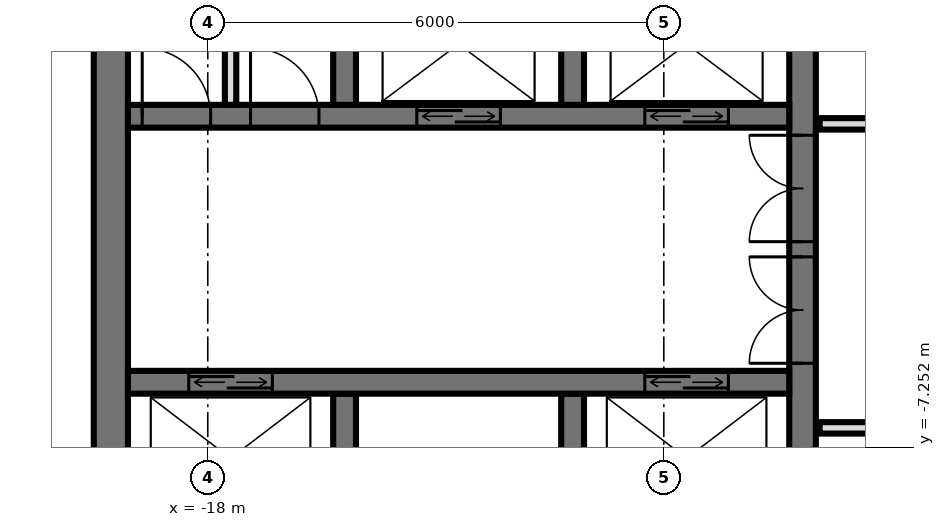
"""IFC4 building model, lengths in metres.
Left out: names, types, materials, properties, quantities, classifications, styles, units other than length and angle.
Written with IfcOpenShell. Run it as: python <this file> out.ifc"""

import sys

from ifc_helpers import new_model, si_unit, direction, frame, frame_2d, origin, place, context, subcontext, project, spatial, rectangle, extrude, element, fill, save


model = new_model("IFC4")
c1 = context("Model", 3, precision=1e-05, world=origin(), true_north=direction((0.0, 1.0)))
c2 = subcontext(c1, "Body", "Model", "MODEL_VIEW")
j1 = project(units=[si_unit("LENGTHUNIT", "METRE"), si_unit("PLANEANGLEUNIT", "RADIAN")], contexts=[c1])
p1 = place(None, origin())
s1 = spatial("IfcSite", under=j1, at=p1, CompositionType="ELEMENT")
p2 = place(p1, origin())
s2 = spatial("IfcBuilding", under=s1, at=p2, CompositionType="ELEMENT")
p3 = place(p2, frame((0.0, 0.0, 338.6)))
s3 = spatial("IfcBuildingStorey", under=s2, at=p3, CompositionType="ELEMENT", Elevation=338.6)
p4 = place(p3, frame((-10.175, -14.55, 0.0), z_axis=(0.0, 0.0, 1.0), x_axis=(0.0, 1.0, 0.0)))
e1 = element("IfcWall", 1, at=p4, inside=s3, PredefinedType="SHEAR", context=c2, shape_type="SweptSolid", body=[
    extrude(rectangle(XDim=14.1, YDim=0.35, at=frame_2d((7.05, 0.0))), origin(), (0.0, 0.0, 1.0), 4.0),
])
p5 = place(p4, frame((8.4, 0.0, 0.0)))
e2 = element("IfcOpeningElement", 2, at=p5, cuts=e1, PredefinedType="OPENING", context=c2, shape_type="SweptSolid", body=[
    extrude(rectangle(XDim=1.4, YDim=2.4, at=frame_2d((0.7, 1.2))), frame((0.0, 0.185, 0.0), z_axis=(0.0, -1.0, 0.0), x_axis=(1.0, 0.0, 0.0)), (0.0, 0.0, 1.0), 0.37),
])
p6 = place(p4, frame((10.0, 0.0, 0.0)))
e3 = element("IfcOpeningElement", 3, at=p6, cuts=e1, PredefinedType="OPENING", context=c2, shape_type="SweptSolid", body=[
    extrude(rectangle(XDim=1.4, YDim=2.4, at=frame_2d((0.7, 1.2))), frame((0.0, 0.185, 0.0), z_axis=(0.0, -1.0, 0.0), x_axis=(1.0, 0.0, 0.0)), (0.0, 0.0, 1.0), 0.37),
])
p7 = place(p4, frame((4.0, 0.0, 0.0)))
e4 = element("IfcOpeningElement", 4, at=p7, cuts=e1, PredefinedType="OPENING", context=c2, shape_type="SweptSolid", body=[
    extrude(rectangle(XDim=1.2, YDim=2.1, at=frame_2d((0.6, 1.05))), frame((0.0, 0.185, 0.0), z_axis=(0.0, -1.0, 0.0), x_axis=(1.0, 0.0, 0.0)), (0.0, 0.0, 1.0), 0.37),
])
p8 = place(p3, frame((-19.275, -14.55, 0.0), z_axis=(0.0, 0.0, 1.0), x_axis=(0.0, 1.0, 0.0)))
e5 = element("IfcWall", 5, at=p8, inside=s3, PredefinedType="SHEAR", context=c2, shape_type="SweptSolid", body=[
    extrude(rectangle(XDim=14.1, YDim=0.45, at=frame_2d((7.05, 0.0))), origin(), (0.0, 0.0, 1.0), 4.0),
])
p9 = place(p3, frame((-19.05, -2.9, 0.0), z_axis=(0.0, 0.0, 1.0), x_axis=(1.0, 0.0, 0.0)))
e6 = element("IfcWall", 6, at=p9, inside=s3, PredefinedType="SHEAR", context=c2, shape_type="SweptSolid", body=[
    extrude(rectangle(XDim=8.7, YDim=0.3, at=frame_2d((4.35, 0.0))), origin(), (0.0, 0.0, 1.0), 4.0),
])
p10 = place(p9, frame((6.8, 0.0, 0.0)))
e7 = element("IfcOpeningElement", 7, at=p10, cuts=e6, PredefinedType="OPENING", context=c2, shape_type="SweptSolid", body=[
    extrude(rectangle(XDim=1.1, YDim=2.1, at=frame_2d((0.55, 1.05))), frame((0.0, 0.16, 0.0), z_axis=(0.0, -1.0, 0.0), x_axis=(1.0, 0.0, 0.0)), (0.0, 0.0, 1.0), 0.32),
])
p11 = place(p9, frame((3.8, 0.0, 0.0)))
e8 = element("IfcOpeningElement", 8, at=p11, cuts=e6, PredefinedType="OPENING", context=c2, shape_type="SweptSolid", body=[
    extrude(rectangle(XDim=1.1, YDim=2.1, at=frame_2d((0.55, 1.05))), frame((0.0, 0.16, 0.0), z_axis=(0.0, -1.0, 0.0), x_axis=(1.0, 0.0, 0.0)), (0.0, 0.0, 1.0), 0.32),
])
p12 = place(p9, frame((1.613, 0.0, 0.0)))
e9 = element("IfcOpeningElement", 9, at=p12, cuts=e6, PredefinedType="OPENING", context=c2, shape_type="SweptSolid", body=[
    extrude(rectangle(XDim=0.9, YDim=2.1, at=frame_2d((0.45, 1.05))), frame((0.0, 0.16, 0.0), z_axis=(0.0, -1.0, 0.0), x_axis=(1.0, 0.0, 0.0)), (0.0, 0.0, 1.0), 0.32),
])
p13 = place(p9, frame((0.188, 0.0, 0.0)))
e10 = element("IfcOpeningElement", 10, at=p13, cuts=e6, PredefinedType="OPENING", context=c2, shape_type="SweptSolid", body=[
    extrude(rectangle(XDim=0.9, YDim=2.1, at=frame_2d((0.45, 1.05))), frame((0.0, 0.16, 0.0), z_axis=(0.0, -1.0, 0.0), x_axis=(1.0, 0.0, 0.0)), (0.0, 0.0, 1.0), 0.32),
])
p14 = place(p3, frame((-19.05, -6.4, 0.0), z_axis=(0.0, 0.0, 1.0), x_axis=(1.0, 0.0, 0.0)))
e11 = element("IfcWall", 11, at=p14, inside=s3, PredefinedType="SHEAR", context=c2, shape_type="SweptSolid", body=[
    extrude(rectangle(XDim=8.7, YDim=0.3, at=frame_2d((4.35, 0.0))), origin(), (0.0, 0.0, 1.0), 4.0),
])
p15 = place(p14, frame((6.8, 0.0, 0.0)))
e12 = element("IfcOpeningElement", 12, at=p15, cuts=e11, PredefinedType="OPENING", context=c2, shape_type="SweptSolid", body=[
    extrude(rectangle(XDim=1.1, YDim=2.1, at=frame_2d((0.55, 1.05))), frame((0.0, 0.16, 0.0), z_axis=(0.0, -1.0, 0.0), x_axis=(1.0, 0.0, 0.0)), (0.0, 0.0, 1.0), 0.32),
])
p16 = place(p14, frame((0.8, 0.0, 0.0)))
e13 = element("IfcOpeningElement", 13, at=p16, cuts=e11, PredefinedType="OPENING", context=c2, shape_type="SweptSolid", body=[
    extrude(rectangle(XDim=1.1, YDim=2.1, at=frame_2d((0.55, 1.05))), frame((0.0, 0.16, 0.0), z_axis=(0.0, -1.0, 0.0), x_axis=(1.0, 0.0, 0.0)), (0.0, 0.0, 1.0), 0.32),
])
for number, where, z_axis, x_axis in (
    (14, (-13.2, -2.75, 0.0), (0.0, 0.0, 1.0), (0.0, 1.0, 0.0)),
    (15, (-13.2, -8.85, 0.0), (0.0, 0.0, 1.0), (0.0, 1.0, 0.0)),
    (16, (-16.2, -2.75, 0.0), (0.0, 0.0, 1.0), (0.0, 1.0, 0.0)),
    (17, (-16.2, -8.85, 0.0), (0.0, 0.0, 1.0), (0.0, 1.0, 0.0)),
):
    element("IfcWall", number, at=place(p3, frame(where, z_axis=z_axis, x_axis=x_axis)), inside=s3, PredefinedType="SHEAR", context=c2, shape_type="SweptSolid", body=[
        extrude(rectangle(XDim=2.3, YDim=0.3, at=frame_2d((1.15, 0.0))), origin(), (0.0, 0.0, 1.0), 4.0),
    ])
p17 = place(p3, frame((-17.7, -2.75, 0.0), z_axis=(0.0, 0.0, 1.0), x_axis=(0.0, 1.0, 0.0)))
e18 = element("IfcWall", 18, at=p17, inside=s3, PredefinedType="PARTITIONING", context=c2, shape_type="SweptSolid", body=[
    extrude(rectangle(XDim=2.3, YDim=0.15, at=frame_2d((1.15, 0.0))), origin(), (0.0, 0.0, 1.0), 3.7),
])
p18 = place(p3, frame((-9.95, -7.0, 0.0), z_axis=(0.0, 0.0, 1.0), x_axis=(1.0, 0.0, 0.0)))
e19 = element("IfcWall", 19, at=p18, inside=s3, PredefinedType="PARTITIONING", context=c2, shape_type="SweptSolid", body=[
    extrude(rectangle(XDim=19.9, YDim=0.15, at=frame_2d((9.95, 0.0))), origin(), (0.0, 0.0, 1.0), 3.72),
])
p19 = place(p18, frame((9.45, 0.0, 0.0)))
e20 = element("IfcOpeningElement", 20, at=p19, cuts=e19, PredefinedType="OPENING", context=c2, shape_type="SweptSolid", body=[
    extrude(rectangle(XDim=1.0, YDim=2.1, at=frame_2d((0.5, 1.05))), frame((0.0, 0.085, 0.0), z_axis=(0.0, -1.0, 0.0), x_axis=(1.0, 0.0, 0.0)), (0.0, 0.0, 1.0), 0.17),
])
p20 = place(p18, frame((1.45, 0.0, 0.0)))
e21 = element("IfcOpeningElement", 21, at=p20, cuts=e19, PredefinedType="OPENING", context=c2, shape_type="SweptSolid", body=[
    extrude(rectangle(XDim=1.0, YDim=2.1, at=frame_2d((0.5, 1.05))), frame((0.0, 0.085, 0.0), z_axis=(0.0, -1.0, 0.0), x_axis=(1.0, 0.0, 0.0)), (0.0, 0.0, 1.0), 0.17),
])
p21 = place(p3, frame((-9.95, -3.0, 0.0), z_axis=(0.0, 0.0, 1.0), x_axis=(1.0, 0.0, 0.0)))
e22 = element("IfcWall", 22, at=p21, inside=s3, PredefinedType="PARTITIONING", context=c2, shape_type="SweptSolid", body=[
    extrude(rectangle(XDim=19.9, YDim=0.15, at=frame_2d((9.95, 0.0))), origin(), (0.0, 0.0, 1.0), 3.72),
])
p22 = place(p21, frame((2.45, 0.0, 0.0)))
e23 = element("IfcOpeningElement", 23, at=p22, cuts=e22, PredefinedType="OPENING", context=c2, shape_type="SweptSolid", body=[
    extrude(rectangle(XDim=1.0, YDim=2.1, at=frame_2d((0.5, 1.05))), frame((0.0, 0.085, 0.0), z_axis=(0.0, -1.0, 0.0), x_axis=(1.0, 0.0, 0.0)), (0.0, 0.0, 1.0), 0.17),
])
p23 = place(p21, frame((6.95, 0.0, 0.0)))
e24 = element("IfcOpeningElement", 24, at=p23, cuts=e22, PredefinedType="OPENING", context=c2, shape_type="SweptSolid", body=[
    extrude(rectangle(XDim=1.0, YDim=2.1, at=frame_2d((0.5, 1.05))), frame((0.0, 0.085, 0.0), z_axis=(0.0, -1.0, 0.0), x_axis=(1.0, 0.0, 0.0)), (0.0, 0.0, 1.0), 0.17),
])
p24 = place(p21, frame((9.7, 0.0, 0.0)))
e25 = element("IfcOpeningElement", 25, at=p24, cuts=e22, PredefinedType="OPENING", context=c2, shape_type="SweptSolid", body=[
    extrude(rectangle(XDim=1.0, YDim=2.1, at=frame_2d((0.5, 1.05))), frame((0.0, 0.085, 0.0), z_axis=(0.0, -1.0, 0.0), x_axis=(1.0, 0.0, 0.0)), (0.0, 0.0, 1.0), 0.17),
])
p25 = place(p21, frame((15.2, 0.0, 0.0)))
e26 = element("IfcOpeningElement", 26, at=p25, cuts=e22, PredefinedType="OPENING", context=c2, shape_type="SweptSolid", body=[
    extrude(rectangle(XDim=1.0, YDim=2.1, at=frame_2d((0.5, 1.05))), frame((0.0, 0.085, 0.0), z_axis=(0.0, -1.0, 0.0), x_axis=(1.0, 0.0, 0.0)), (0.0, 0.0, 1.0), 0.17),
])
p26 = place(p10, origin())
e27 = element("IfcDoor", 27, at=p26, inside=s3, OperationType="DOUBLE_DOOR_SLIDING", PredefinedType="USERDEFINED", context=c2, shape_type="SweptSolid", body=[
    extrude(rectangle(XDim=1.1, YDim=2.1, at=frame_2d((0.55, 1.05))), frame((0.0, 0.025, 0.0), z_axis=(0.0, -1.0, 0.0), x_axis=(1.0, 0.0, 0.0)), (0.0, 0.0, 1.0), 0.05),
])
fill(e7, e27)
p27 = place(p11, origin())
e28 = element("IfcDoor", 28, at=p27, inside=s3, OperationType="DOUBLE_DOOR_SLIDING", PredefinedType="USERDEFINED", context=c2, shape_type="SweptSolid", body=[
    extrude(rectangle(XDim=1.1, YDim=2.1, at=frame_2d((0.55, 1.05))), frame((0.0, 0.025, 0.0), z_axis=(0.0, -1.0, 0.0), x_axis=(1.0, 0.0, 0.0)), (0.0, 0.0, 1.0), 0.05),
])
fill(e8, e28)
p28 = place(p15, origin())
e29 = element("IfcDoor", 29, at=p28, inside=s3, OperationType="DOUBLE_DOOR_SLIDING", PredefinedType="USERDEFINED", context=c2, shape_type="SweptSolid", body=[
    extrude(rectangle(XDim=1.1, YDim=2.1, at=frame_2d((0.55, 1.05))), frame((0.0, 0.025, 0.0), z_axis=(0.0, -1.0, 0.0), x_axis=(1.0, 0.0, 0.0)), (0.0, 0.0, 1.0), 0.05),
])
fill(e12, e29)
p29 = place(p16, origin())
e30 = element("IfcDoor", 30, at=p29, inside=s3, OperationType="DOUBLE_DOOR_SLIDING", PredefinedType="USERDEFINED", context=c2, shape_type="SweptSolid", body=[
    extrude(rectangle(XDim=1.1, YDim=2.1, at=frame_2d((0.55, 1.05))), frame((0.0, 0.025, 0.0), z_axis=(0.0, -1.0, 0.0), x_axis=(1.0, 0.0, 0.0)), (0.0, 0.0, 1.0), 0.05),
])
fill(e13, e30)
p30 = place(p5, origin())
e31 = element("IfcDoor", 31, at=p30, inside=s3, OperationType="DOUBLE_DOOR_SINGLE_SWING", PredefinedType="DOOR", context=c2, shape_type="SweptSolid", body=[
    extrude(rectangle(XDim=1.4, YDim=2.4, at=frame_2d((0.7, 1.2))), frame((0.0, 0.025, 0.0), z_axis=(0.0, -1.0, 0.0), x_axis=(1.0, 0.0, 0.0)), (0.0, 0.0, 1.0), 0.05),
])
fill(e2, e31)
p31 = place(p6, origin())
e32 = element("IfcDoor", 32, at=p31, inside=s3, OperationType="DOUBLE_DOOR_SINGLE_SWING", PredefinedType="DOOR", context=c2, shape_type="SweptSolid", body=[
    extrude(rectangle(XDim=1.4, YDim=2.4, at=frame_2d((0.7, 1.2))), frame((0.0, 0.025, 0.0), z_axis=(0.0, -1.0, 0.0), x_axis=(1.0, 0.0, 0.0)), (0.0, 0.0, 1.0), 0.05),
])
fill(e3, e32)
p32 = place(p12, origin())
e33 = element("IfcDoor", 33, at=p32, inside=s3, OperationType="SINGLE_SWING_RIGHT", PredefinedType="DOOR", context=c2, shape_type="SweptSolid", body=[
    extrude(rectangle(XDim=0.9, YDim=2.1, at=frame_2d((0.45, 1.05))), frame((0.0, 0.025, 0.0), z_axis=(0.0, -1.0, 0.0), x_axis=(1.0, 0.0, 0.0)), (0.0, 0.0, 1.0), 0.05),
])
fill(e9, e33)
p33 = place(p13, origin())
e34 = element("IfcDoor", 34, at=p33, inside=s3, OperationType="SINGLE_SWING_RIGHT", PredefinedType="DOOR", context=c2, shape_type="SweptSolid", body=[
    extrude(rectangle(XDim=0.9, YDim=2.1, at=frame_2d((0.45, 1.05))), frame((0.0, 0.025, 0.0), z_axis=(0.0, -1.0, 0.0), x_axis=(1.0, 0.0, 0.0)), (0.0, 0.0, 1.0), 0.05),
])
fill(e10, e34)
save(model, sys.argv[1])
